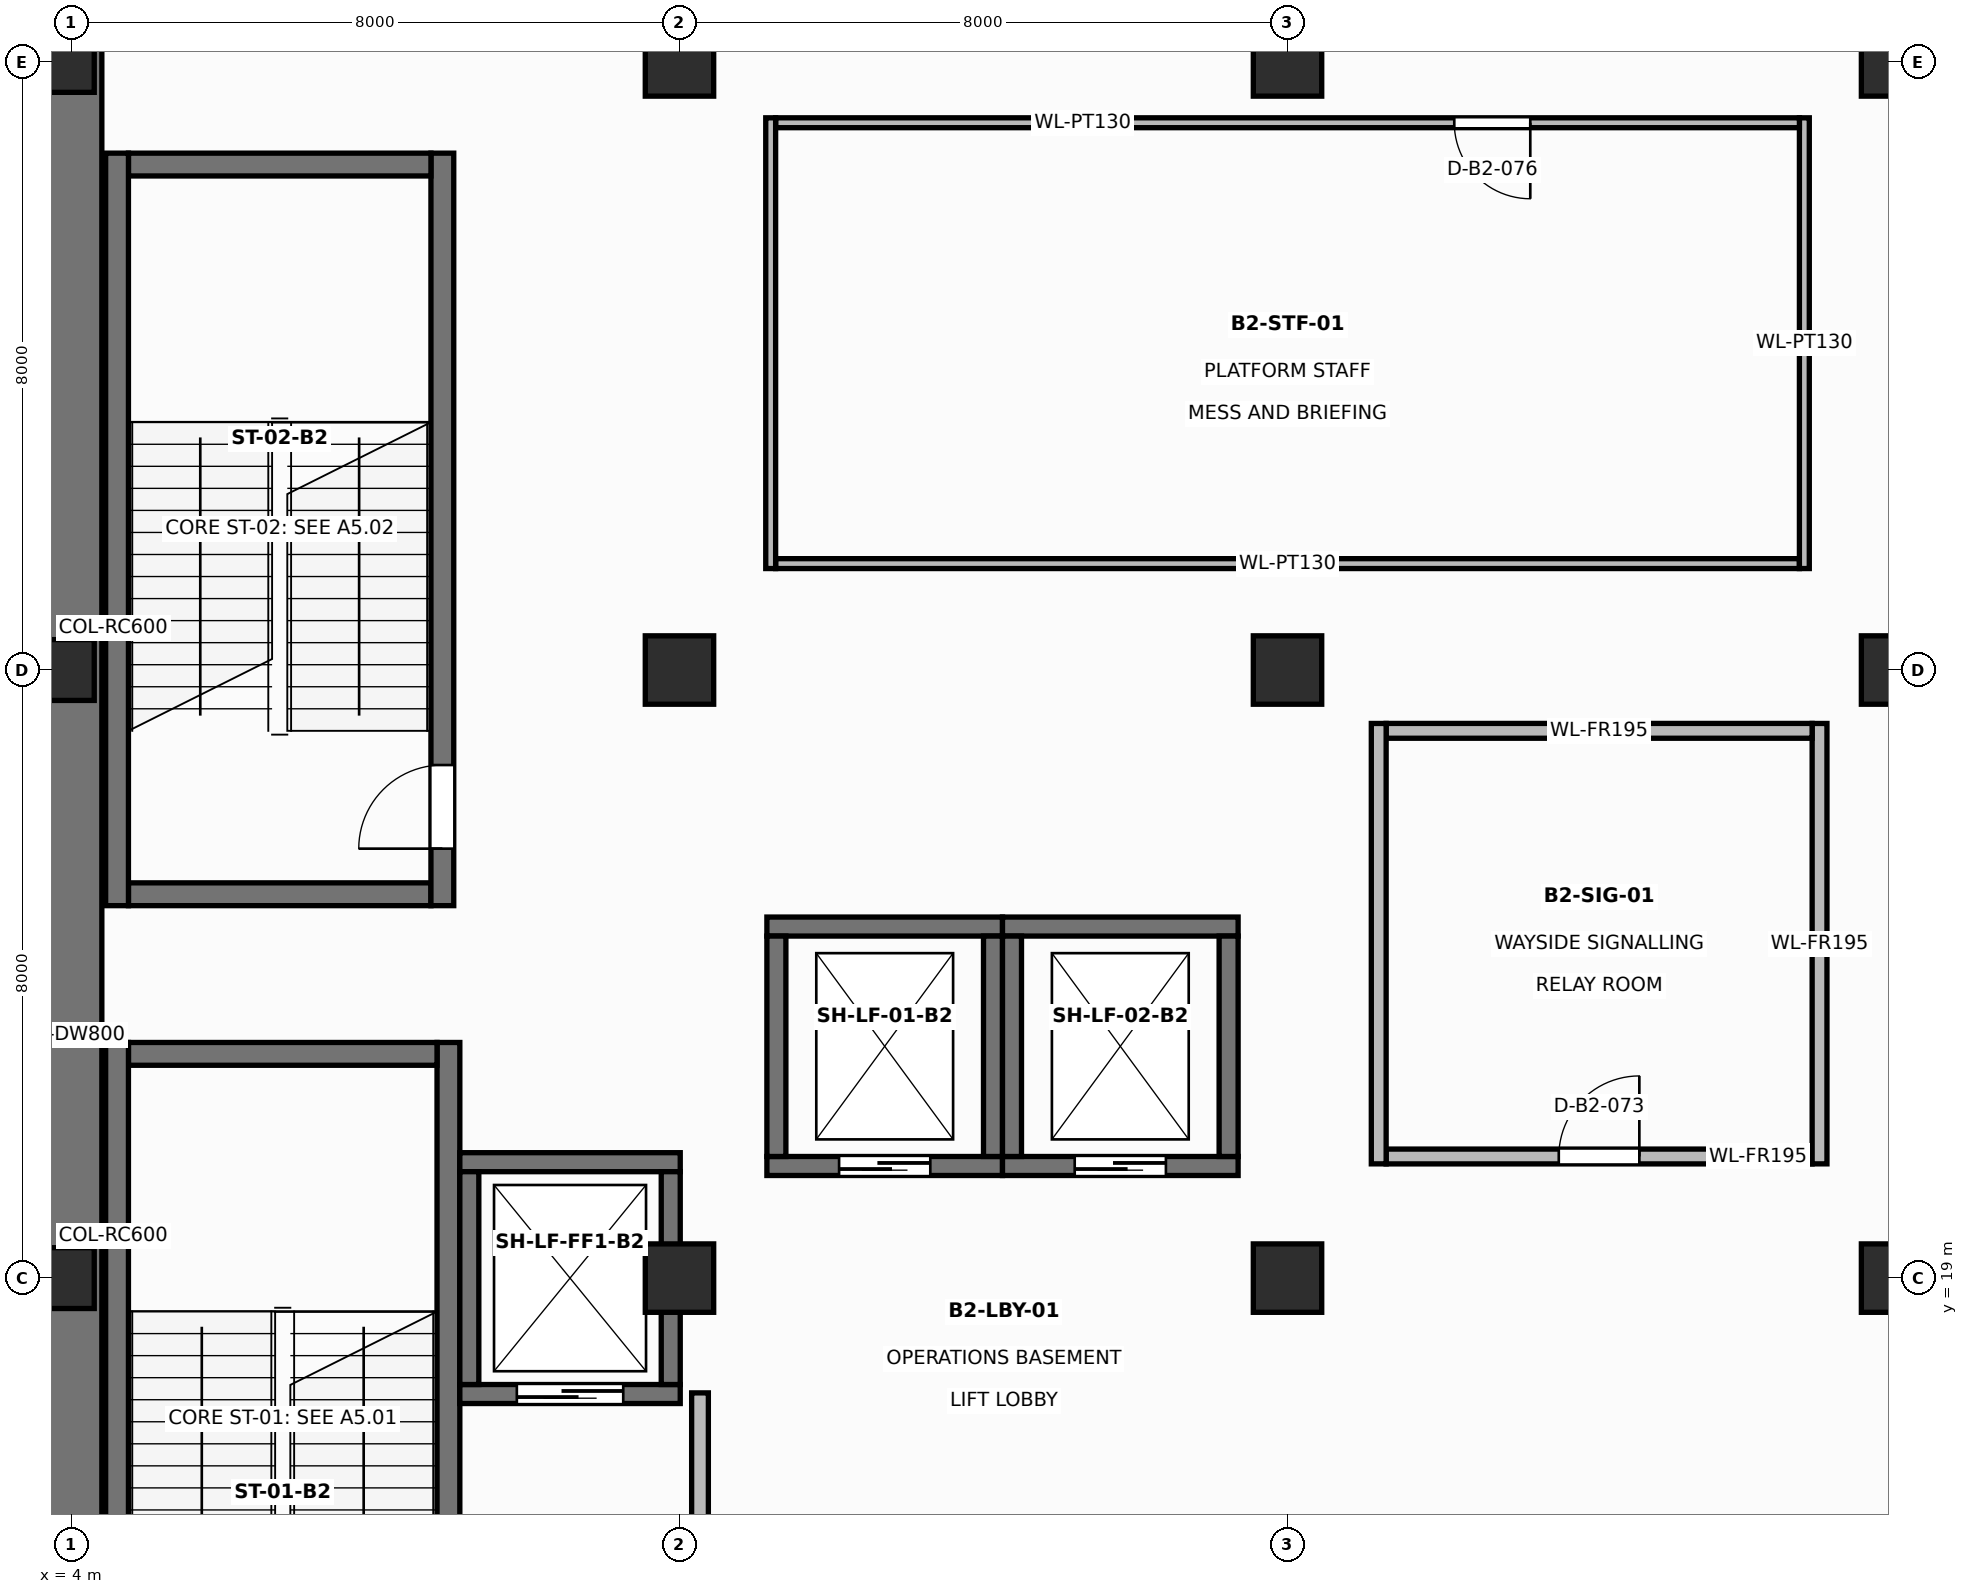
"""IFC4 building model, lengths in metres.
Left out: names, types, materials, properties, quantities, classifications, styles, units other than length and angle.
Written with IfcOpenShell. Run it as: python <this file> out.ifc"""

import sys

from ifc_helpers import new_model, si_unit, direction, frame, frame_2d, origin, origin_2d, place, context, subcontext, project, spatial, rectangle, extrude, element, fill, save


model = new_model("IFC4")
c1 = context("Model", 3, precision=1e-05, world=origin(), true_north=direction((0.0, 1.0)))
c2 = subcontext(c1, "Body", "Model", "MODEL_VIEW")
j1 = project(units=[si_unit("LENGTHUNIT", "METRE"), si_unit("PLANEANGLEUNIT", "RADIAN")], contexts=[c1])
p1 = place(None, origin())
s1 = spatial("IfcSite", under=j1, at=p1, CompositionType="ELEMENT")
p2 = place(p1, origin())
s2 = spatial("IfcBuilding", under=s1, at=p2, CompositionType="ELEMENT")
p3 = place(p2, frame((0.0, 0.0, -11.2)))
s3 = spatial("IfcBuildingStorey", under=s2, at=p3, CompositionType="ELEMENT", Elevation=-11.2)
p4 = place(p3, frame((4.0, 2.6, 0.0), z_axis=(0.0, 0.0, 1.0), x_axis=(0.0, 1.0, 0.0)))
e1 = element("IfcWall", 1, at=p4, inside=s3, PredefinedType="SOLIDWALL", context=c2, shape_type="SweptSolid", body=[
    extrude(rectangle(XDim=114.8, YDim=0.8, at=frame_2d((57.4, 0.0))), origin(), (0.0, 0.0, 1.0), 5.22),
])
for number, where, z_axis, x_axis in (
    (2, (4.0, 19.0, 0.0), (0.0, 0.0, 1.0), (1.0, 0.0, 0.0)),
    (3, (4.0, 27.0, 0.0), (0.0, 0.0, 1.0), (1.0, 0.0, 0.0)),
    (4, (4.0, 35.0, 0.0), (0.0, 0.0, 1.0), (1.0, 0.0, 0.0)),
):
    element("IfcColumn", number, at=place(p3, frame(where, z_axis=z_axis, x_axis=x_axis)), inside=s3, PredefinedType="PILASTER", context=c2, shape_type="SweptSolid", body=[
        extrude(rectangle(XDim=0.6, YDim=0.8, at=origin_2d()), origin(), (0.0, 0.0, 1.0), 5.6),
    ])
for number, where, z_axis, x_axis in (
    (5, (12.0, 19.0, 0.0), (0.0, 0.0, 1.0), (1.0, 0.0, 0.0)),
    (6, (12.0, 27.0, 0.0), (0.0, 0.0, 1.0), (1.0, 0.0, 0.0)),
    (7, (12.0, 35.0, 0.0), (0.0, 0.0, 1.0), (1.0, 0.0, 0.0)),
    (8, (20.0, 19.0, 0.0), (0.0, 0.0, 1.0), (1.0, 0.0, 0.0)),
    (9, (20.0, 27.0, 0.0), (0.0, 0.0, 1.0), (1.0, 0.0, 0.0)),
    (10, (20.0, 35.0, 0.0), (0.0, 0.0, 1.0), (1.0, 0.0, 0.0)),
    (11, (28.0, 19.0, 0.0), (0.0, 0.0, 1.0), (1.0, 0.0, 0.0)),
    (12, (28.0, 27.0, 0.0), (0.0, 0.0, 1.0), (1.0, 0.0, 0.0)),
    (13, (28.0, 35.0, 0.0), (0.0, 0.0, 1.0), (1.0, 0.0, 0.0)),
):
    element("IfcColumn", number, at=place(p3, frame(where, z_axis=z_axis, x_axis=x_axis)), inside=s3, PredefinedType="COLUMN", context=c2, shape_type="SweptSolid", body=[
        extrude(rectangle(XDim=0.9, YDim=0.9, at=origin_2d()), origin(), (0.0, 0.0, 1.0), 5.6),
    ])
p5 = place(p3, frame((8.96, 12.2, 0.0), z_axis=(0.0, 0.0, 1.0), x_axis=(0.0, 1.0, 0.0)))
e14 = element("IfcWall", 14, at=p5, inside=s3, PredefinedType="SHEAR", context=c2, shape_type="SweptSolid", body=[
    extrude(rectangle(XDim=9.9, YDim=0.3, at=frame_2d((4.95, 0.0))), origin(), (0.0, 0.0, 1.0), 5.235),
])
p6 = place(p5, frame((0.75, 0.0, 0.0)))
e15 = element("IfcOpeningElement", 15, at=p6, cuts=e14, PredefinedType="OPENING", context=c2, shape_type="SweptSolid", body=[
    extrude(rectangle(XDim=1.1, YDim=2.15, at=frame_2d((0.55, 1.075))), frame((0.0, 0.16, 0.0), z_axis=(0.0, -1.0, 0.0), x_axis=(1.0, 0.0, 0.0)), (0.0, 0.0, 1.0), 0.32),
])
p7 = place(p3, frame((8.81, 21.95, 0.0), z_axis=(0.0, 0.0, 1.0), x_axis=(-1.0, 0.0, 0.0)))
e16 = element("IfcWall", 16, at=p7, inside=s3, PredefinedType="SHEAR", context=c2, shape_type="SweptSolid", body=[
    extrude(rectangle(XDim=4.06, YDim=0.3, at=frame_2d((2.03, 0.0))), origin(), (0.0, 0.0, 1.0), 5.235),
])
p8 = place(p3, frame((4.6, 22.1, 0.0), z_axis=(0.0, 0.0, 1.0), x_axis=(0.0, -1.0, 0.0)))
e17 = element("IfcWall", 17, at=p8, inside=s3, PredefinedType="SHEAR", context=c2, shape_type="SweptSolid", body=[
    extrude(rectangle(XDim=9.9, YDim=0.3, at=frame_2d((4.95, 0.0))), origin(), (0.0, 0.0, 1.0), 5.235),
])
p9 = place(p3, frame((4.75, 24.05, 0.0), z_axis=(0.0, 0.0, 1.0), x_axis=(1.0, 0.0, 0.0)))
e18 = element("IfcWall", 18, at=p9, inside=s3, PredefinedType="SHEAR", context=c2, shape_type="SweptSolid", body=[
    extrude(rectangle(XDim=3.98, YDim=0.3, at=frame_2d((1.99, 0.0))), origin(), (0.0, 0.0, 1.0), 5.235),
])
p10 = place(p3, frame((8.88, 23.9, 0.0), z_axis=(0.0, 0.0, 1.0), x_axis=(0.0, 1.0, 0.0)))
e19 = element("IfcWall", 19, at=p10, inside=s3, PredefinedType="SHEAR", context=c2, shape_type="SweptSolid", body=[
    extrude(rectangle(XDim=9.9, YDim=0.3, at=frame_2d((4.95, 0.0))), origin(), (0.0, 0.0, 1.0), 5.235),
])
p11 = place(p10, frame((0.75, 0.0, 0.0)))
e20 = element("IfcOpeningElement", 20, at=p11, cuts=e19, PredefinedType="OPENING", context=c2, shape_type="SweptSolid", body=[
    extrude(rectangle(XDim=1.1, YDim=2.15, at=frame_2d((0.55, 1.075))), frame((0.0, 0.16, 0.0), z_axis=(0.0, -1.0, 0.0), x_axis=(1.0, 0.0, 0.0)), (0.0, 0.0, 1.0), 0.32),
])
p12 = place(p3, frame((8.73, 33.65, 0.0), z_axis=(0.0, 0.0, 1.0), x_axis=(-1.0, 0.0, 0.0)))
e21 = element("IfcWall", 21, at=p12, inside=s3, PredefinedType="SHEAR", context=c2, shape_type="SweptSolid", body=[
    extrude(rectangle(XDim=3.98, YDim=0.3, at=frame_2d((1.99, 0.0))), origin(), (0.0, 0.0, 1.0), 5.235),
])
p13 = place(p3, frame((4.6, 33.8, 0.0), z_axis=(0.0, 0.0, 1.0), x_axis=(0.0, -1.0, 0.0)))
e22 = element("IfcWall", 22, at=p13, inside=s3, PredefinedType="SHEAR", context=c2, shape_type="SweptSolid", body=[
    extrude(rectangle(XDim=9.9, YDim=0.3, at=frame_2d((4.95, 0.0))), origin(), (0.0, 0.0, 1.0), 5.235),
])
p14 = place(p3, frame((9.11, 17.475, 0.0), z_axis=(0.0, 0.0, 1.0), x_axis=(1.0, 0.0, 0.0)))
e23 = element("IfcWall", 23, at=p14, inside=s3, PredefinedType="SOLIDWALL", context=c2, shape_type="SweptSolid", body=[
    extrude(rectangle(XDim=2.9, YDim=0.25, at=frame_2d((1.45, 0.0))), origin(), (0.0, 0.0, 1.0), 5.235),
])
p15 = place(p14, frame((0.75, 0.0, 0.0)))
e24 = element("IfcOpeningElement", 24, at=p15, cuts=e23, PredefinedType="OPENING", context=c2, shape_type="SweptSolid", body=[
    extrude(rectangle(XDim=1.4, YDim=2.25, at=frame_2d((0.7, 1.125))), frame((0.0, 0.135, 0.0), z_axis=(0.0, -1.0, 0.0), x_axis=(1.0, 0.0, 0.0)), (0.0, 0.0, 1.0), 0.27),
])
p16 = place(p3, frame((12.01, 20.525, 0.0), z_axis=(0.0, 0.0, 1.0), x_axis=(-1.0, 0.0, 0.0)))
e25 = element("IfcWall", 25, at=p16, inside=s3, PredefinedType="SOLIDWALL", context=c2, shape_type="SweptSolid", body=[
    extrude(rectangle(XDim=2.9, YDim=0.25, at=frame_2d((1.45, 0.0))), origin(), (0.0, 0.0, 1.0), 5.235),
])
for number, where, z_axis, x_axis in (
    (26, (11.885, 17.6, 0.0), (0.0, 0.0, 1.0), (0.0, 1.0, 0.0)),
    (27, (9.235, 20.4, 0.0), (0.0, 0.0, 1.0), (0.0, -1.0, 0.0)),
):
    element("IfcWall", number, at=place(p3, frame(where, z_axis=z_axis, x_axis=x_axis)), inside=s3, PredefinedType="SOLIDWALL", context=c2, shape_type="SweptSolid", body=[
        extrude(rectangle(XDim=2.8, YDim=0.25, at=frame_2d((1.4, 0.0))), origin(), (0.0, 0.0, 1.0), 5.235),
    ])
p17 = place(p3, frame((12.27, 12.28, 0.0), z_axis=(0.0, 0.0, 1.0), x_axis=(0.0, 1.0, 0.0)))
e28 = element("IfcWall", 28, at=p17, inside=s3, PredefinedType="SOLIDWALL", context=c2, shape_type="SweptSolid", body=[
    extrude(rectangle(XDim=5.21, YDim=0.22, at=frame_2d((2.605, 0.0))), origin(), (0.0, 0.0, 1.0), 4.435),
])
p18 = place(p3, frame((13.15, 20.475, 0.0), z_axis=(0.0, 0.0, 1.0), x_axis=(1.0, 0.0, 0.0)))
e29 = element("IfcWall", 29, at=p18, inside=s3, PredefinedType="SOLIDWALL", context=c2, shape_type="SweptSolid", body=[
    extrude(rectangle(XDim=3.1, YDim=0.25, at=frame_2d((1.55, 0.0))), origin(), (0.0, 0.0, 1.0), 5.235),
])
p19 = place(p18, frame((0.95, 0.0, 0.0)))
e30 = element("IfcOpeningElement", 30, at=p19, cuts=e29, PredefinedType="OPENING", context=c2, shape_type="SweptSolid", body=[
    extrude(rectangle(XDim=1.2, YDim=2.2, at=frame_2d((0.6, 1.1))), frame((0.0, 0.135, 0.0), z_axis=(0.0, -1.0, 0.0), x_axis=(1.0, 0.0, 0.0)), (0.0, 0.0, 1.0), 0.27),
])
p20 = place(p3, frame((16.25, 23.625, 0.0), z_axis=(0.0, 0.0, 1.0), x_axis=(-1.0, 0.0, 0.0)))
e31 = element("IfcWall", 31, at=p20, inside=s3, PredefinedType="SOLIDWALL", context=c2, shape_type="SweptSolid", body=[
    extrude(rectangle(XDim=3.1, YDim=0.25, at=frame_2d((1.55, 0.0))), origin(), (0.0, 0.0, 1.0), 5.235),
])
for number, where, z_axis, x_axis in (
    (32, (16.125, 20.6, 0.0), (0.0, 0.0, 1.0), (0.0, 1.0, 0.0)),
    (33, (13.275, 23.5, 0.0), (0.0, 0.0, 1.0), (0.0, -1.0, 0.0)),
):
    element("IfcWall", number, at=place(p3, frame(where, z_axis=z_axis, x_axis=x_axis)), inside=s3, PredefinedType="SOLIDWALL", context=c2, shape_type="SweptSolid", body=[
        extrude(rectangle(XDim=2.9, YDim=0.25, at=frame_2d((1.45, 0.0))), origin(), (0.0, 0.0, 1.0), 5.235),
    ])
p21 = place(p3, frame((16.25, 20.475, 0.0), z_axis=(0.0, 0.0, 1.0), x_axis=(1.0, 0.0, 0.0)))
e34 = element("IfcWall", 34, at=p21, inside=s3, PredefinedType="SOLIDWALL", context=c2, shape_type="SweptSolid", body=[
    extrude(rectangle(XDim=3.1, YDim=0.25, at=frame_2d((1.55, 0.0))), origin(), (0.0, 0.0, 1.0), 5.235),
])
p22 = place(p21, frame((0.95, 0.0, 0.0)))
e35 = element("IfcOpeningElement", 35, at=p22, cuts=e34, PredefinedType="OPENING", context=c2, shape_type="SweptSolid", body=[
    extrude(rectangle(XDim=1.2, YDim=2.2, at=frame_2d((0.6, 1.1))), frame((0.0, 0.135, 0.0), z_axis=(0.0, -1.0, 0.0), x_axis=(1.0, 0.0, 0.0)), (0.0, 0.0, 1.0), 0.27),
])
p23 = place(p3, frame((19.35, 23.625, 0.0), z_axis=(0.0, 0.0, 1.0), x_axis=(-1.0, 0.0, 0.0)))
e36 = element("IfcWall", 36, at=p23, inside=s3, PredefinedType="SOLIDWALL", context=c2, shape_type="SweptSolid", body=[
    extrude(rectangle(XDim=3.1, YDim=0.25, at=frame_2d((1.55, 0.0))), origin(), (0.0, 0.0, 1.0), 5.235),
])
for number, where, z_axis, x_axis in (
    (37, (19.225, 20.6, 0.0), (0.0, 0.0, 1.0), (0.0, 1.0, 0.0)),
    (38, (16.375, 23.5, 0.0), (0.0, 0.0, 1.0), (0.0, -1.0, 0.0)),
):
    element("IfcWall", number, at=place(p3, frame(where, z_axis=z_axis, x_axis=x_axis)), inside=s3, PredefinedType="SOLIDWALL", context=c2, shape_type="SweptSolid", body=[
        extrude(rectangle(XDim=2.9, YDim=0.25, at=frame_2d((1.45, 0.0))), origin(), (0.0, 0.0, 1.0), 5.235),
    ])
p24 = place(p3, frame((21.297, 20.6, 0.0), z_axis=(0.0, 0.0, 1.0), x_axis=(1.0, 0.0, 0.0)))
e39 = element("IfcWall", 39, at=p24, inside=s3, PredefinedType="PARTITIONING", context=c2, shape_type="SweptSolid", body=[
    extrude(rectangle(XDim=5.605, YDim=0.195, at=frame_2d((2.802, 0.0))), origin(), (0.0, 0.0, 1.0), 5.22),
])
p25 = place(p24, frame((2.272, 0.0, 0.0)))
e40 = element("IfcOpeningElement", 40, at=p25, cuts=e39, PredefinedType="OPENING", context=c2, shape_type="SweptSolid", body=[
    extrude(rectangle(XDim=1.06, YDim=2.16, at=frame_2d((0.53, 1.08))), frame((0.0, 0.107, 0.0), z_axis=(0.0, -1.0, 0.0), x_axis=(1.0, 0.0, 0.0)), (0.0, 0.0, 1.0), 0.215),
])
p26 = place(p3, frame((27.0, 20.503, 0.0), z_axis=(0.0, 0.0, 1.0), x_axis=(0.0, 1.0, 0.0)))
e41 = element("IfcWall", 41, at=p26, inside=s3, PredefinedType="PARTITIONING", context=c2, shape_type="SweptSolid", body=[
    extrude(rectangle(XDim=5.794, YDim=0.195, at=frame_2d((2.897, 0.0))), origin(), (0.0, 0.0, 1.0), 4.585),
])
p27 = place(p3, frame((26.902, 26.2, 0.0), z_axis=(0.0, 0.0, 1.0), x_axis=(-1.0, 0.0, 0.0)))
e42 = element("IfcWall", 42, at=p27, inside=s3, PredefinedType="PARTITIONING", context=c2, shape_type="SweptSolid", body=[
    extrude(rectangle(XDim=5.605, YDim=0.195, at=frame_2d((2.802, 0.0))), origin(), (0.0, 0.0, 1.0), 5.22),
])
p28 = place(p3, frame((21.2, 26.297, 0.0), z_axis=(0.0, 0.0, 1.0), x_axis=(0.0, -1.0, 0.0)))
e43 = element("IfcWall", 43, at=p28, inside=s3, PredefinedType="PARTITIONING", context=c2, shape_type="SweptSolid", body=[
    extrude(rectangle(XDim=5.794, YDim=0.195, at=frame_2d((2.897, 0.0))), origin(), (0.0, 0.0, 1.0), 4.585),
])
p29 = place(p3, frame((13.265, 28.4, 0.0), z_axis=(0.0, 0.0, 1.0), x_axis=(1.0, 0.0, 0.0)))
e44 = element("IfcWall", 44, at=p29, inside=s3, PredefinedType="PARTITIONING", context=c2, shape_type="SweptSolid", body=[
    extrude(rectangle(XDim=13.47, YDim=0.13, at=frame_2d((6.735, 0.0))), origin(), (0.0, 0.0, 1.0), 4.435),
])
p30 = place(p3, frame((26.8, 28.335, 0.0), z_axis=(0.0, 0.0, 1.0), x_axis=(0.0, 1.0, 0.0)))
e45 = element("IfcWall", 45, at=p30, inside=s3, PredefinedType="PARTITIONING", context=c2, shape_type="SweptSolid", body=[
    extrude(rectangle(XDim=5.93, YDim=0.13, at=frame_2d((2.965, 0.0))), origin(), (0.0, 0.0, 1.0), 4.585),
])
p31 = place(p3, frame((26.735, 34.2, 0.0), z_axis=(0.0, 0.0, 1.0), x_axis=(-1.0, 0.0, 0.0)))
e46 = element("IfcWall", 46, at=p31, inside=s3, PredefinedType="PARTITIONING", context=c2, shape_type="SweptSolid", body=[
    extrude(rectangle(XDim=13.47, YDim=0.13, at=frame_2d((6.735, 0.0))), origin(), (0.0, 0.0, 1.0), 4.435),
])
p32 = place(p31, frame((3.541, 0.0, 0.0)))
e47 = element("IfcOpeningElement", 47, at=p32, cuts=e46, PredefinedType="OPENING", context=c2, shape_type="SweptSolid", body=[
    extrude(rectangle(XDim=1.0, YDim=2.15, at=frame_2d((0.5, 1.075))), frame((0.0, 0.075, 0.0), z_axis=(0.0, -1.0, 0.0), x_axis=(1.0, 0.0, 0.0)), (0.0, 0.0, 1.0), 0.15),
])
p33 = place(p3, frame((13.2, 34.265, 0.0), z_axis=(0.0, 0.0, 1.0), x_axis=(0.0, -1.0, 0.0)))
e48 = element("IfcWall", 48, at=p33, inside=s3, PredefinedType="PARTITIONING", context=c2, shape_type="SweptSolid", body=[
    extrude(rectangle(XDim=5.93, YDim=0.13, at=frame_2d((2.965, 0.0))), origin(), (0.0, 0.0, 1.0), 4.585),
])
p34 = place(p11, origin())
e49 = element("IfcDoor", 49, at=p34, inside=s3, OperationType="SINGLE_SWING_LEFT", PredefinedType="DOOR", context=c2, shape_type="SweptSolid", body=[
    extrude(rectangle(XDim=1.1, YDim=2.15, at=frame_2d((0.55, 1.075))), frame((0.0, 0.025, 0.0), z_axis=(0.0, -1.0, 0.0), x_axis=(1.0, 0.0, 0.0)), (0.0, 0.0, 1.0), 0.05),
])
fill(e20, e49)
p35 = place(p15, frame((1.4, 0.0, 0.0), z_axis=(0.0, 0.0, 1.0), x_axis=(-1.0, 0.0, 0.0)))
e50 = element("IfcDoor", 50, at=p35, inside=s3, OperationType="DOUBLE_DOOR_SLIDING", PredefinedType="DOOR", context=c2, shape_type="SweptSolid", body=[
    extrude(rectangle(XDim=1.4, YDim=2.25, at=frame_2d((0.7, 1.125))), frame((0.0, 0.025, 0.0), z_axis=(0.0, -1.0, 0.0), x_axis=(1.0, 0.0, 0.0)), (0.0, 0.0, 1.0), 0.05),
])
fill(e24, e50)
p36 = place(p19, frame((1.2, 0.0, 0.0), z_axis=(0.0, 0.0, 1.0), x_axis=(-1.0, 0.0, 0.0)))
e51 = element("IfcDoor", 51, at=p36, inside=s3, OperationType="DOUBLE_DOOR_SLIDING", PredefinedType="DOOR", context=c2, shape_type="SweptSolid", body=[
    extrude(rectangle(XDim=1.2, YDim=2.2, at=frame_2d((0.6, 1.1))), frame((0.0, 0.025, 0.0), z_axis=(0.0, -1.0, 0.0), x_axis=(1.0, 0.0, 0.0)), (0.0, 0.0, 1.0), 0.05),
])
fill(e30, e51)
p37 = place(p22, frame((1.2, 0.0, 0.0), z_axis=(0.0, 0.0, 1.0), x_axis=(-1.0, 0.0, 0.0)))
e52 = element("IfcDoor", 52, at=p37, inside=s3, OperationType="DOUBLE_DOOR_SLIDING", PredefinedType="DOOR", context=c2, shape_type="SweptSolid", body=[
    extrude(rectangle(XDim=1.2, YDim=2.2, at=frame_2d((0.6, 1.1))), frame((0.0, 0.025, 0.0), z_axis=(0.0, -1.0, 0.0), x_axis=(1.0, 0.0, 0.0)), (0.0, 0.0, 1.0), 0.05),
])
fill(e35, e52)
p38 = place(p25, origin())
e53 = element("IfcDoor", 53, at=p38, inside=s3, OperationType="SINGLE_SWING_RIGHT", PredefinedType="DOOR", context=c2, shape_type="SweptSolid", body=[
    extrude(rectangle(XDim=1.06, YDim=2.16, at=frame_2d((0.53, 1.08))), frame((0.0, 0.025, 0.0), z_axis=(0.0, -1.0, 0.0), x_axis=(1.0, 0.0, 0.0)), (0.0, 0.0, 1.0), 0.05),
])
fill(e40, e53)
p39 = place(p32, origin())
e54 = element("IfcDoor", 54, at=p39, inside=s3, OperationType="SINGLE_SWING_LEFT", PredefinedType="DOOR", context=c2, shape_type="SweptSolid", body=[
    extrude(rectangle(XDim=1.0, YDim=2.15, at=frame_2d((0.5, 1.075))), frame((0.0, 0.025, 0.0), z_axis=(0.0, -1.0, 0.0), x_axis=(1.0, 0.0, 0.0)), (0.0, 0.0, 1.0), 0.05),
])
fill(e47, e54)
save(model, sys.argv[1])
